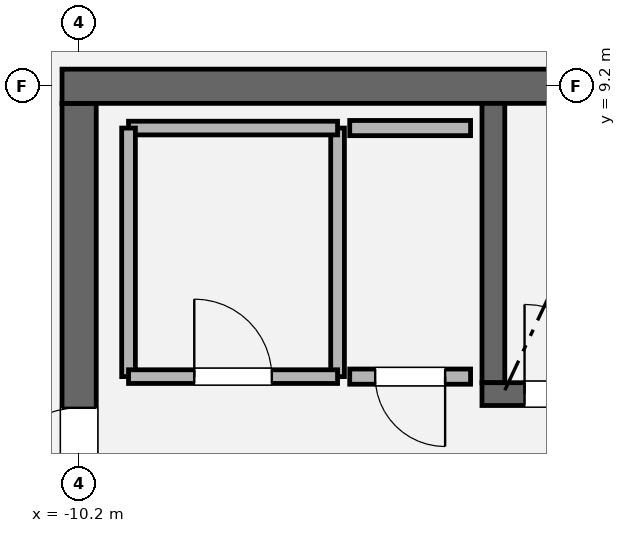
"""IFC4 building model, lengths in metres.
Left out: names, types, materials, properties, quantities, classifications, styles, units other than length and angle.
Written with IfcOpenShell. Run it as: python <this file> out.ifc"""

import sys

from ifc_helpers import new_model, si_unit, direction, frame, frame_2d, origin, place, context, subcontext, project, spatial, rectangle, extrude, element, fill, save


model = new_model("IFC4")
c1 = context("Model", 3, precision=1e-05, world=origin(), true_north=direction((0.0, 1.0)))
c2 = subcontext(c1, "Body", "Model", "MODEL_VIEW")
j1 = project(units=[si_unit("LENGTHUNIT", "METRE"), si_unit("PLANEANGLEUNIT", "RADIAN")], contexts=[c1])
p1 = place(None, origin())
s1 = spatial("IfcSite", under=j1, at=p1, CompositionType="ELEMENT")
p2 = place(p1, origin())
s2 = spatial("IfcBuilding", under=s1, at=p2, CompositionType="ELEMENT")
p3 = place(p2, frame((0.0, 0.0, 339.0)))
s3 = spatial("IfcBuildingStorey", under=s2, at=p3, CompositionType="ELEMENT", Elevation=339.0)
p4 = place(p3, frame((-10.2, -8.975, 0.0), z_axis=(0.0, 0.0, 1.0), x_axis=(0.0, 1.0, 0.0)))
e1 = element("IfcWall", 1, at=p4, inside=s3, PredefinedType="SHEAR", context=c2, shape_type="SweptSolid", body=[
    extrude(rectangle(XDim=17.95, YDim=0.45, at=frame_2d((8.975, 0.0))), origin(), (0.0, 0.0, 1.0), 4.8),
])
p5 = place(p4, frame((12.765, 0.0, 0.0)))
e2 = element("IfcOpeningElement", 2, at=p5, cuts=e1, PredefinedType="OPENING", context=c2, shape_type="SweptSolid", body=[
    extrude(rectangle(XDim=1.18, YDim=2.2, at=frame_2d((0.59, 1.1))), frame((0.0, 0.235, 0.0), z_axis=(0.0, -1.0, 0.0), x_axis=(1.0, 0.0, 0.0)), (0.0, 0.0, 1.0), 0.47),
])
p6 = place(p3, frame((-10.425, 9.2, 0.0), z_axis=(0.0, 0.0, 1.0), x_axis=(1.0, 0.0, 0.0)))
e3 = element("IfcWall", 3, at=p6, inside=s3, PredefinedType="SHEAR", context=c2, shape_type="SweptSolid", body=[
    extrude(rectangle(XDim=20.85, YDim=0.45, at=frame_2d((10.425, 0.0))), origin(), (0.0, 0.0, 1.0), 4.8),
])
p7 = place(p3, frame((-4.75, 5.3, 0.0), z_axis=(0.0, 0.0, 1.0), x_axis=(0.0, 1.0, 0.0)))
e4 = element("IfcWall", 4, at=p7, inside=s3, PredefinedType="SOLIDWALL", context=c2, shape_type="SweptSolid", body=[
    extrude(rectangle(XDim=3.675, YDim=0.3, at=frame_2d((1.837, 0.0))), origin(), (0.0, 0.0, 1.0), 4.8),
])
p8 = place(p3, frame((-4.9, 5.15, 0.0), z_axis=(0.0, 0.0, 1.0), x_axis=(1.0, 0.0, 0.0)))
e5 = element("IfcWall", 5, at=p8, inside=s3, PredefinedType="SOLIDWALL", context=c2, shape_type="SweptSolid", body=[
    extrude(rectangle(XDim=9.8, YDim=0.3, at=frame_2d((4.9, 0.0))), origin(), (0.0, 0.0, 1.0), 4.8),
])
p9 = place(p8, frame((0.56, 0.0, 0.0)))
e6 = element("IfcOpeningElement", 6, at=p9, cuts=e5, PredefinedType="OPENING", context=c2, shape_type="SweptSolid", body=[
    extrude(rectangle(XDim=1.18, YDim=2.2, at=frame_2d((0.59, 1.1))), frame((0.0, 0.16, 0.0), z_axis=(0.0, -1.0, 0.0), x_axis=(1.0, 0.0, 0.0)), (0.0, 0.0, 1.0), 0.32),
])
p10 = place(p3, frame((-6.8, 5.38, 0.0), z_axis=(0.0, 0.0, 1.0), x_axis=(0.0, 1.0, 0.0)))
e7 = element("IfcWall", 7, at=p10, inside=s3, PredefinedType="PARTITIONING", context=c2, shape_type="SweptSolid", body=[
    extrude(rectangle(XDim=3.27, YDim=0.18, at=frame_2d((1.635, 0.0))), origin(), (0.0, 0.0, 1.0), 4.52),
])
p11 = place(p3, frame((-6.8, 8.65, 0.0), z_axis=(0.0, 0.0, 1.0), x_axis=(-1.0, 0.0, 0.0)))
e8 = element("IfcWall", 8, at=p11, inside=s3, PredefinedType="PARTITIONING", context=c2, shape_type="SweptSolid", body=[
    extrude(rectangle(XDim=2.75, YDim=0.18, at=frame_2d((1.375, 0.0))), origin(), (0.0, 0.0, 1.0), 4.52),
])
p12 = place(p3, frame((-9.55, 8.65, 0.0), z_axis=(0.0, 0.0, 1.0), x_axis=(0.0, -1.0, 0.0)))
e9 = element("IfcWall", 9, at=p12, inside=s3, PredefinedType="PARTITIONING", context=c2, shape_type="SweptSolid", body=[
    extrude(rectangle(XDim=3.27, YDim=0.18, at=frame_2d((1.635, 0.0))), origin(), (0.0, 0.0, 1.0), 4.52),
])
p13 = place(p3, frame((-9.55, 5.38, 0.0), z_axis=(0.0, 0.0, 1.0), x_axis=(1.0, 0.0, 0.0)))
e10 = element("IfcWall", 10, at=p13, inside=s3, PredefinedType="PARTITIONING", context=c2, shape_type="SweptSolid", body=[
    extrude(rectangle(XDim=2.75, YDim=0.18, at=frame_2d((1.375, 0.0))), origin(), (0.0, 0.0, 1.0), 4.52),
])
p14 = place(p13, frame((0.865, 0.0, 0.0)))
e11 = element("IfcOpeningElement", 11, at=p14, cuts=e10, PredefinedType="OPENING", context=c2, shape_type="SweptSolid", body=[
    extrude(rectangle(XDim=1.02, YDim=2.2, at=frame_2d((0.51, 1.1))), frame((0.0, 0.1, 0.0), z_axis=(0.0, -1.0, 0.0), x_axis=(1.0, 0.0, 0.0)), (0.0, 0.0, 1.0), 0.2),
])
p15 = place(p3, frame((-5.05, 8.65, 0.0), z_axis=(0.0, 0.0, 1.0), x_axis=(-1.0, 0.0, 0.0)))
e12 = element("IfcWall", 12, at=p15, inside=s3, PredefinedType="SOLIDWALL", context=c2, shape_type="SweptSolid", body=[
    extrude(rectangle(XDim=1.59, YDim=0.2, at=frame_2d((0.795, 0.0))), origin(), (0.0, 0.0, 1.0), 4.52),
])
p16 = place(p3, frame((-6.64, 5.38, 0.0), z_axis=(0.0, 0.0, 1.0), x_axis=(1.0, 0.0, 0.0)))
e13 = element("IfcWall", 13, at=p16, inside=s3, PredefinedType="SOLIDWALL", context=c2, shape_type="SweptSolid", body=[
    extrude(rectangle(XDim=1.59, YDim=0.2, at=frame_2d((0.795, 0.0))), origin(), (0.0, 0.0, 1.0), 4.52),
])
p17 = place(p16, frame((0.335, 0.0, 0.0)))
e14 = element("IfcOpeningElement", 14, at=p17, cuts=e13, PredefinedType="OPENING", context=c2, shape_type="SweptSolid", body=[
    extrude(rectangle(XDim=0.92, YDim=2.1, at=frame_2d((0.46, 1.05))), frame((0.0, 0.11, 0.0), z_axis=(0.0, -1.0, 0.0), x_axis=(1.0, 0.0, 0.0)), (0.0, 0.0, 1.0), 0.22),
])
p18 = place(p9, origin())
e15 = element("IfcDoor", 15, at=p18, inside=s3, OperationType="SINGLE_SWING_LEFT", PredefinedType="DOOR", context=c2, shape_type="SweptSolid", body=[
    extrude(rectangle(XDim=1.18, YDim=2.2, at=frame_2d((0.59, 1.1))), frame((0.0, 0.025, 0.0), z_axis=(0.0, -1.0, 0.0), x_axis=(1.0, 0.0, 0.0)), (0.0, 0.0, 1.0), 0.05),
])
fill(e6, e15)
p19 = place(p5, origin())
e16 = element("IfcDoor", 16, at=p19, inside=s3, OperationType="SINGLE_SWING_LEFT", PredefinedType="DOOR", context=c2, shape_type="SweptSolid", body=[
    extrude(rectangle(XDim=1.18, YDim=2.2, at=frame_2d((0.59, 1.1))), frame((0.0, 0.025, 0.0), z_axis=(0.0, -1.0, 0.0), x_axis=(1.0, 0.0, 0.0)), (0.0, 0.0, 1.0), 0.05),
])
fill(e2, e16)
p20 = place(p14, origin())
e17 = element("IfcDoor", 17, at=p20, inside=s3, OperationType="SINGLE_SWING_LEFT", PredefinedType="DOOR", context=c2, shape_type="SweptSolid", body=[
    extrude(rectangle(XDim=1.02, YDim=2.2, at=frame_2d((0.51, 1.1))), frame((0.0, 0.025, 0.0), z_axis=(0.0, -1.0, 0.0), x_axis=(1.0, 0.0, 0.0)), (0.0, 0.0, 1.0), 0.05),
])
fill(e11, e17)
p21 = place(p17, origin())
e18 = element("IfcDoor", 18, at=p21, inside=s3, OperationType="SINGLE_SWING_RIGHT", PredefinedType="DOOR", context=c2, shape_type="SweptSolid", body=[
    extrude(rectangle(XDim=0.92, YDim=2.1, at=frame_2d((0.46, 1.05))), frame((0.0, 0.025, 0.0), z_axis=(0.0, -1.0, 0.0), x_axis=(1.0, 0.0, 0.0)), (0.0, 0.0, 1.0), 0.05),
])
fill(e14, e18)
save(model, sys.argv[1])
